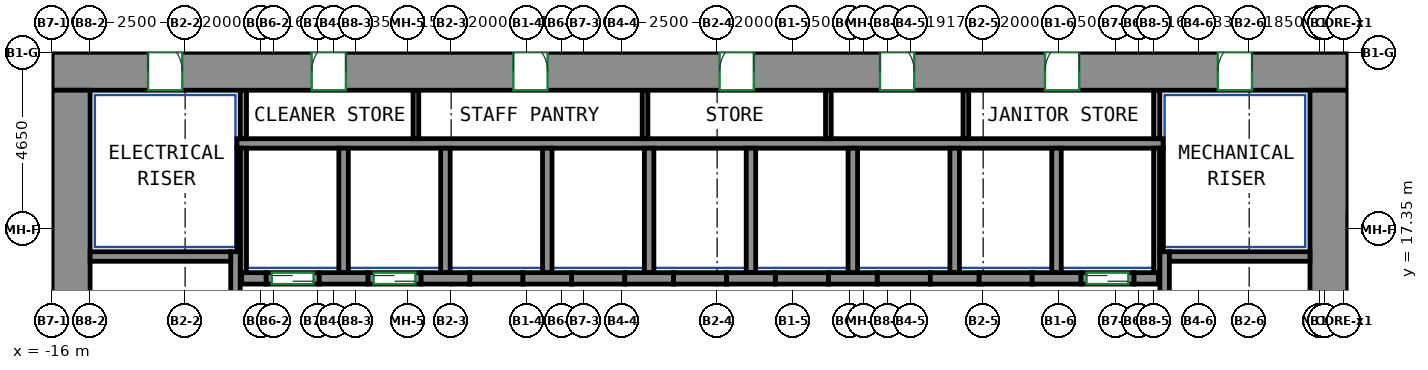
"""IFC4 building model, lengths in metres.
Left out: names, types, materials, properties, quantities, classifications, styles, units other than length and angle.
Written with IfcOpenShell. Run it as: python <this file> out.ifc"""

import sys

from ifc_helpers import new_model, si_unit, direction, frame, frame_2d, origin, place, context, subcontext, project, spatial, rectangle, extrude, source, transform, mapped, element, fill, save


model = new_model("IFC4")
c1 = context("Model", 3, precision=1e-05, world=origin(), true_north=direction((0.0, 1.0)))
c2 = subcontext(c1, "Body", "Model", "MODEL_VIEW")
j1 = project(units=[si_unit("LENGTHUNIT", "METRE"), si_unit("PLANEANGLEUNIT", "RADIAN")], contexts=[c1])
p1 = place(None, origin())
s1 = spatial("IfcSite", under=j1, at=p1, CompositionType="ELEMENT")
p2 = place(p1, origin())
s2 = spatial("IfcBuilding", under=s1, at=p2, CompositionType="ELEMENT")
p3 = place(p2, frame((0.0, 0.0, 71.2)))
s3 = spatial("IfcBuildingStorey", under=s2, at=p3, CompositionType="ELEMENT", Elevation=71.2)
m1 = source(origin(), c2, "Body", "SweptSolid", [
    extrude(rectangle(XDim=34.1, YDim=1.0, at=frame_2d((17.05, 0.0))), origin(), (0.0, 0.0, 1.0), 3.72),
])
p4 = place(p3, frame((-16.0, 21.5, 0.0), z_axis=(0.0, 0.0, 1.0), x_axis=(1.0, 0.0, 0.0)))
e1 = element("IfcWall", 1, at=p4, inside=s3, PredefinedType="SHEAR", context=c2, shape_type="MappedRepresentation", body=[
    mapped(m1, transform((0.0, 0.0, 0.0))),
])
p5 = place(p4, frame((6.831, 0.0, 0.0)))
e2 = element("IfcOpeningElement", 2, at=p5, cuts=e1, PredefinedType="OPENING", context=c2, shape_type="SweptSolid", body=[
    extrude(rectangle(XDim=0.9, YDim=2.1, at=frame_2d((0.45, 1.05))), frame((0.0, 0.51, 0.0), z_axis=(0.0, -1.0, 0.0), x_axis=(1.0, 0.0, 0.0)), (0.0, 0.0, 1.0), 1.02),
])
p6 = place(p4, frame((12.138, 0.0, 0.0)))
e3 = element("IfcOpeningElement", 3, at=p6, cuts=e1, PredefinedType="OPENING", context=c2, shape_type="SweptSolid", body=[
    extrude(rectangle(XDim=0.9, YDim=2.1, at=frame_2d((0.45, 1.05))), frame((0.0, 0.51, 0.0), z_axis=(0.0, -1.0, 0.0), x_axis=(1.0, 0.0, 0.0)), (0.0, 0.0, 1.0), 1.02),
])
p7 = place(p4, frame((17.565, 0.0, 0.0)))
e4 = element("IfcOpeningElement", 4, at=p7, cuts=e1, PredefinedType="OPENING", context=c2, shape_type="SweptSolid", body=[
    extrude(rectangle(XDim=0.9, YDim=2.1, at=frame_2d((0.45, 1.05))), frame((0.0, 0.51, 0.0), z_axis=(0.0, -1.0, 0.0), x_axis=(1.0, 0.0, 0.0)), (0.0, 0.0, 1.0), 1.02),
])
p8 = place(p4, frame((21.786, 0.0, 0.0)))
e5 = element("IfcOpeningElement", 5, at=p8, cuts=e1, PredefinedType="OPENING", context=c2, shape_type="SweptSolid", body=[
    extrude(rectangle(XDim=0.9, YDim=2.1, at=frame_2d((0.45, 1.05))), frame((0.0, 0.51, 0.0), z_axis=(0.0, -1.0, 0.0), x_axis=(1.0, 0.0, 0.0)), (0.0, 0.0, 1.0), 1.02),
])
p9 = place(p4, frame((26.127, 0.0, 0.0)))
e6 = element("IfcOpeningElement", 6, at=p9, cuts=e1, PredefinedType="OPENING", context=c2, shape_type="SweptSolid", body=[
    extrude(rectangle(XDim=0.9, YDim=2.1, at=frame_2d((0.45, 1.05))), frame((0.0, 0.51, 0.0), z_axis=(0.0, -1.0, 0.0), x_axis=(1.0, 0.0, 0.0)), (0.0, 0.0, 1.0), 1.02),
])
p10 = place(p4, frame((2.525, 0.0, 0.0)))
e7 = element("IfcOpeningElement", 7, at=p10, cuts=e1, PredefinedType="OPENING", context=c2, shape_type="SweptSolid", body=[
    extrude(rectangle(XDim=0.9, YDim=2.1, at=frame_2d((0.45, 1.05))), frame((0.0, 0.51, 0.0), z_axis=(0.0, -1.0, 0.0), x_axis=(1.0, 0.0, 0.0)), (0.0, 0.0, 1.0), 1.02),
])
p11 = place(p4, frame((30.675, 0.0, 0.0)))
e8 = element("IfcOpeningElement", 8, at=p11, cuts=e1, PredefinedType="OPENING", context=c2, shape_type="SweptSolid", body=[
    extrude(rectangle(XDim=0.9, YDim=2.1, at=frame_2d((0.45, 1.05))), frame((0.0, 0.51, 0.0), z_axis=(0.0, -1.0, 0.0), x_axis=(1.0, 0.0, 0.0)), (0.0, 0.0, 1.0), 1.02),
])
m2 = source(origin(), c2, "Body", "SweptSolid", [
    extrude(rectangle(XDim=12.0, YDim=1.0, at=frame_2d((6.0, 0.0))), origin(), (0.0, 0.0, 1.0), 3.72),
])
for number, where, z_axis, x_axis in (
    (9, (-15.5, 9.0, 0.0), (0.0, 0.0, 1.0), (0.0, 1.0, 0.0)),
    (10, (17.6, 9.0, 0.0), (0.0, 0.0, 1.0), (0.0, 1.0, 0.0)),
):
    element("IfcWall", number, at=place(p3, frame(where, z_axis=z_axis, x_axis=x_axis)), inside=s3, PredefinedType="SHEAR", context=c2, shape_type="MappedRepresentation", body=[
        mapped(m2, transform((0.0, 0.0, 0.0))),
    ])
m3 = source(origin(), c2, "Body", "SweptSolid", [
    extrude(rectangle(XDim=7.75, YDim=0.25, at=frame_2d((3.875, 0.0))), origin(), (0.0, 0.0, 1.0), 3.72),
])
p12 = place(p3, frame((-11.175, 9.0, 0.0), z_axis=(0.0, 0.0, 1.0), x_axis=(0.0, 1.0, 0.0)))
e11 = element("IfcWall", 11, at=p12, inside=s3, PredefinedType="SHEAR", context=c2, shape_type="MappedRepresentation", body=[
    mapped(m3, transform((0.0, 0.0, 0.0))),
])
m4 = source(origin(), c2, "Body", "SweptSolid", [
    extrude(rectangle(XDim=3.7, YDim=0.25, at=frame_2d((1.85, 0.0))), origin(), (0.0, 0.0, 1.0), 3.72),
])
p13 = place(p3, frame((-15.0, 16.625, 0.0), z_axis=(0.0, 0.0, 1.0), x_axis=(1.0, 0.0, 0.0)))
e12 = element("IfcWall", 12, at=p13, inside=s3, PredefinedType="SHEAR", context=c2, shape_type="MappedRepresentation", body=[
    mapped(m4, transform((0.0, 0.0, 0.0))),
])
p14 = place(p3, frame((13.275, 9.0, 0.0), z_axis=(0.0, 0.0, 1.0), x_axis=(0.0, 1.0, 0.0)))
e13 = element("IfcWall", 13, at=p14, inside=s3, PredefinedType="SHEAR", context=c2, shape_type="MappedRepresentation", body=[
    mapped(m3, transform((0.0, 0.0, 0.0))),
])
m5 = source(origin(), c2, "Body", "SweptSolid", [
    extrude(rectangle(XDim=3.7, YDim=0.25, at=frame_2d((1.85, 0.0))), origin(), (0.0, 0.0, 1.0), 3.72),
])
p15 = place(p3, frame((13.4, 16.625, 0.0), z_axis=(0.0, 0.0, 1.0), x_axis=(1.0, 0.0, 0.0)))
e14 = element("IfcWall", 14, at=p15, inside=s3, PredefinedType="SHEAR", context=c2, shape_type="MappedRepresentation", body=[
    mapped(m5, transform((0.0, 0.0, 0.0))),
])
m6 = source(origin(), c2, "Body", "SweptSolid", [
    extrude(rectangle(XDim=0.64, YDim=0.3, at=frame_2d((0.32, 0.0))), origin(), (0.0, 0.0, 1.0), 3.72),
])
p16 = place(p3, frame((-11.01, 16.05, 0.0), z_axis=(0.0, 0.0, 1.0), x_axis=(1.0, 0.0, 0.0)))
e15 = element("IfcWall", 15, at=p16, inside=s3, PredefinedType="SHEAR", context=c2, shape_type="MappedRepresentation", body=[
    mapped(m6, transform((0.0, 0.0, 0.0))),
])
m7 = source(origin(), c2, "Body", "SweptSolid", [
    extrude(rectangle(XDim=1.28, YDim=0.3, at=frame_2d((0.64, 0.0))), origin(), (0.0, 0.0, 1.0), 3.72),
])
for number, where, z_axis, x_axis in (
    (16, (-8.97, 16.05, 0.0), (0.0, 0.0, 1.0), (1.0, 0.0, 0.0)),
    (17, (-6.29, 16.05, 0.0), (0.0, 0.0, 1.0), (1.0, 0.0, 0.0)),
    (18, (-3.61, 16.05, 0.0), (0.0, 0.0, 1.0), (1.0, 0.0, 0.0)),
    (19, (-0.93, 16.05, 0.0), (0.0, 0.0, 1.0), (1.0, 0.0, 0.0)),
    (20, (1.75, 16.05, 0.0), (0.0, 0.0, 1.0), (1.0, 0.0, 0.0)),
    (21, (4.43, 16.05, 0.0), (0.0, 0.0, 1.0), (1.0, 0.0, 0.0)),
):
    element("IfcWall", number, at=place(p3, frame(where, z_axis=z_axis, x_axis=x_axis)), inside=s3, PredefinedType="SHEAR", context=c2, shape_type="MappedRepresentation", body=[
        mapped(m7, transform((0.0, 0.0, 0.0))),
    ])
m8 = source(origin(), c2, "Body", "SweptSolid", [
    extrude(rectangle(XDim=1.28, YDim=0.3, at=frame_2d((0.64, 0.0))), origin(), (0.0, 0.0, 1.0), 3.72),
])
p17 = place(p3, frame((7.11, 16.05, 0.0), z_axis=(0.0, 0.0, 1.0), x_axis=(1.0, 0.0, 0.0)))
e22 = element("IfcWall", 22, at=p17, inside=s3, PredefinedType="SHEAR", context=c2, shape_type="MappedRepresentation", body=[
    mapped(m8, transform((0.0, 0.0, 0.0))),
])
p18 = place(p3, frame((9.79, 16.05, 0.0), z_axis=(0.0, 0.0, 1.0), x_axis=(1.0, 0.0, 0.0)))
e23 = element("IfcWall", 23, at=p18, inside=s3, PredefinedType="SHEAR", context=c2, shape_type="MappedRepresentation", body=[
    mapped(m7, transform((0.0, 0.0, 0.0))),
])
m9 = source(origin(), c2, "Body", "SweptSolid", [
    extrude(rectangle(XDim=0.64, YDim=0.3, at=frame_2d((0.32, 0.0))), origin(), (0.0, 0.0, 1.0), 3.72),
])
p19 = place(p3, frame((12.47, 16.05, 0.0), z_axis=(0.0, 0.0, 1.0), x_axis=(1.0, 0.0, 0.0)))
e24 = element("IfcWall", 24, at=p19, inside=s3, PredefinedType="SHEAR", context=c2, shape_type="MappedRepresentation", body=[
    mapped(m9, transform((0.0, 0.0, 0.0))),
])
m10 = source(origin(), c2, "Body", "SweptSolid", [
    extrude(rectangle(XDim=1.4, YDim=0.3, at=frame_2d((0.7, 0.0))), origin(), (0.0, 0.0, 1.0), 3.72),
])
p20 = place(p3, frame((11.07, 16.05, 0.0), z_axis=(0.0, 0.0, 1.0), x_axis=(1.0, 0.0, 0.0)))
e25 = element("IfcWall", 25, at=p20, inside=s3, PredefinedType="PARTITIONING", context=c2, shape_type="MappedRepresentation", body=[
    mapped(m10, transform((0.0, 0.0, 0.0))),
])
p21 = place(p20, frame((0.15, 0.0, 0.0)))
e26 = element("IfcOpeningElement", 26, at=p21, cuts=e25, PredefinedType="OPENING", context=c2, shape_type="SweptSolid", body=[
    extrude(rectangle(XDim=1.1, YDim=2.1, at=frame_2d((0.55, 1.05))), frame((0.0, 0.16, 0.0), z_axis=(0.0, -1.0, 0.0), x_axis=(1.0, 0.0, 0.0)), (0.0, 0.0, 1.0), 0.32),
])
m11 = source(origin(), c2, "Body", "SweptSolid", [
    extrude(rectangle(XDim=1.4, YDim=0.3, at=frame_2d((0.7, 0.0))), origin(), (0.0, 0.0, 1.0), 3.72),
])
p22 = place(p3, frame((-10.37, 16.05, 0.0), z_axis=(0.0, 0.0, 1.0), x_axis=(1.0, 0.0, 0.0)))
e27 = element("IfcWall", 27, at=p22, inside=s3, PredefinedType="PARTITIONING", context=c2, shape_type="MappedRepresentation", body=[
    mapped(m11, transform((0.0, 0.0, 0.0))),
])
p23 = place(p22, frame((0.15, 0.0, 0.0)))
e28 = element("IfcOpeningElement", 28, at=p23, cuts=e27, PredefinedType="OPENING", context=c2, shape_type="SweptSolid", body=[
    extrude(rectangle(XDim=1.1, YDim=2.1, at=frame_2d((0.55, 1.05))), frame((0.0, 0.16, 0.0), z_axis=(0.0, -1.0, 0.0), x_axis=(1.0, 0.0, 0.0)), (0.0, 0.0, 1.0), 0.32),
])
p24 = place(p3, frame((-7.69, 16.05, 0.0), z_axis=(0.0, 0.0, 1.0), x_axis=(1.0, 0.0, 0.0)))
e29 = element("IfcWall", 29, at=p24, inside=s3, PredefinedType="PARTITIONING", context=c2, shape_type="MappedRepresentation", body=[
    mapped(m10, transform((0.0, 0.0, 0.0))),
])
p25 = place(p24, frame((0.15, 0.0, 0.0)))
e30 = element("IfcOpeningElement", 30, at=p25, cuts=e29, PredefinedType="OPENING", context=c2, shape_type="SweptSolid", body=[
    extrude(rectangle(XDim=1.1, YDim=2.1, at=frame_2d((0.55, 1.05))), frame((0.0, 0.16, 0.0), z_axis=(0.0, -1.0, 0.0), x_axis=(1.0, 0.0, 0.0)), (0.0, 0.0, 1.0), 0.32),
])
p26 = place(p3, frame((-5.01, 16.05, 0.0), z_axis=(0.0, 0.0, 1.0), x_axis=(1.0, 0.0, 0.0)))
e31 = element("IfcWall", 31, at=p26, inside=s3, PredefinedType="PARTITIONING", context=c2, shape_type="MappedRepresentation", body=[
    mapped(m10, transform((0.0, 0.0, 0.0))),
])
p27 = place(p3, frame((-2.33, 16.05, 0.0), z_axis=(0.0, 0.0, 1.0), x_axis=(1.0, 0.0, 0.0)))
e32 = element("IfcWall", 32, at=p27, inside=s3, PredefinedType="PARTITIONING", context=c2, shape_type="MappedRepresentation", body=[
    mapped(m11, transform((0.0, 0.0, 0.0))),
])
for number, where, z_axis, x_axis in (
    (33, (0.35, 16.05, 0.0), (0.0, 0.0, 1.0), (1.0, 0.0, 0.0)),
    (34, (3.03, 16.05, 0.0), (0.0, 0.0, 1.0), (1.0, 0.0, 0.0)),
):
    element("IfcWall", number, at=place(p3, frame(where, z_axis=z_axis, x_axis=x_axis)), inside=s3, PredefinedType="PARTITIONING", context=c2, shape_type="MappedRepresentation", body=[
        mapped(m10, transform((0.0, 0.0, 0.0))),
    ])
for number, where, z_axis, x_axis in (
    (35, (5.71, 16.05, 0.0), (0.0, 0.0, 1.0), (1.0, 0.0, 0.0)),
    (36, (8.39, 16.05, 0.0), (0.0, 0.0, 1.0), (1.0, 0.0, 0.0)),
):
    element("IfcWall", number, at=place(p3, frame(where, z_axis=z_axis, x_axis=x_axis)), inside=s3, PredefinedType="PARTITIONING", context=c2, shape_type="MappedRepresentation", body=[
        mapped(m11, transform((0.0, 0.0, 0.0))),
    ])
m12 = source(origin(), c2, "Body", "SweptSolid", [
    extrude(rectangle(XDim=24.37, YDim=0.25, at=frame_2d((12.185, 0.0))), origin(), (0.0, 0.0, 1.0), 3.72),
])
p28 = place(p3, frame((-11.135, 19.6, 0.0), z_axis=(0.0, 0.0, 1.0), x_axis=(1.0, 0.0, 0.0)))
e37 = element("IfcWall", 37, at=p28, inside=s3, PredefinedType="PARTITIONING", context=c2, shape_type="MappedRepresentation", body=[
    mapped(m12, transform((0.0, 0.0, 0.0))),
])
m13 = source(origin(), c2, "Body", "SweptSolid", [
    extrude(rectangle(XDim=3.275, YDim=0.165, at=frame_2d((1.638, 0.0))), origin(), (0.0, 0.0, 1.0), 3.72),
])
p29 = place(p3, frame((13.067, 16.2, 0.0), z_axis=(0.0, 0.0, 1.0), x_axis=(0.0, 1.0, 0.0)))
e38 = element("IfcWall", 38, at=p29, inside=s3, PredefinedType="PARTITIONING", context=c2, shape_type="MappedRepresentation", body=[
    mapped(m13, transform((0.0, 0.0, 0.0))),
])
m14 = source(origin(), c2, "Body", "SweptSolid", [
    extrude(rectangle(XDim=1.275, YDim=0.165, at=frame_2d((0.637, 0.0))), origin(), (0.0, 0.0, 1.0), 3.72),
])
p30 = place(p3, frame((13.067, 19.725, 0.0), z_axis=(0.0, 0.0, 1.0), x_axis=(0.0, 1.0, 0.0)))
e39 = element("IfcWall", 39, at=p30, inside=s3, PredefinedType="PARTITIONING", context=c2, shape_type="MappedRepresentation", body=[
    mapped(m14, transform((0.0, 0.0, 0.0))),
])
p31 = place(p3, frame((-10.968, 16.2, 0.0), z_axis=(0.0, 0.0, 1.0), x_axis=(0.0, 1.0, 0.0)))
e40 = element("IfcWall", 40, at=p31, inside=s3, PredefinedType="PARTITIONING", context=c2, shape_type="MappedRepresentation", body=[
    mapped(m13, transform((0.0, 0.0, 0.0))),
])
p32 = place(p3, frame((-10.968, 19.725, 0.0), z_axis=(0.0, 0.0, 1.0), x_axis=(0.0, 1.0, 0.0)))
e41 = element("IfcWall", 41, at=p32, inside=s3, PredefinedType="PARTITIONING", context=c2, shape_type="MappedRepresentation", body=[
    mapped(m14, transform((0.0, 0.0, 0.0))),
])
m15 = source(origin(), c2, "Body", "SweptSolid", [
    extrude(rectangle(XDim=3.275, YDim=0.25, at=frame_2d((1.638, 0.0))), origin(), (0.0, 0.0, 1.0), 3.72),
])
p33 = place(p3, frame((10.43, 16.2, 0.0), z_axis=(0.0, 0.0, 1.0), x_axis=(0.0, 1.0, 0.0)))
e42 = element("IfcWall", 42, at=p33, inside=s3, PredefinedType="PARTITIONING", context=c2, shape_type="MappedRepresentation", body=[
    mapped(m15, transform((0.0, 0.0, 0.0))),
])
m16 = source(origin(), c2, "Body", "SweptSolid", [
    extrude(rectangle(XDim=2.725, YDim=0.085, at=frame_2d((1.363, 0.0))), origin(), (0.0, 0.0, 1.0), 3.72),
])
p34 = place(p3, frame((13.192, 16.75, 0.0), z_axis=(0.0, 0.0, 1.0), x_axis=(0.0, 1.0, 0.0)))
e43 = element("IfcWall", 43, at=p34, inside=s3, PredefinedType="PARTITIONING", context=c2, shape_type="MappedRepresentation", body=[
    mapped(m16, transform((0.0, 0.0, 0.0))),
])
for number, where, z_axis, x_axis in (
    (44, (2.39, 16.2, 0.0), (0.0, 0.0, 1.0), (0.0, 1.0, 0.0)),
    (45, (5.07, 16.2, 0.0), (0.0, 0.0, 1.0), (0.0, 1.0, 0.0)),
    (46, (7.75, 16.2, 0.0), (0.0, 0.0, 1.0), (0.0, 1.0, 0.0)),
    (47, (-0.29, 16.2, 0.0), (0.0, 0.0, 1.0), (0.0, 1.0, 0.0)),
):
    element("IfcWall", number, at=place(p3, frame(where, z_axis=z_axis, x_axis=x_axis)), inside=s3, PredefinedType="PARTITIONING", context=c2, shape_type="MappedRepresentation", body=[
        mapped(m15, transform((0.0, 0.0, 0.0))),
    ])
p35 = place(p3, frame((-11.093, 16.75, 0.0), z_axis=(0.0, 0.0, 1.0), x_axis=(0.0, 1.0, 0.0)))
e48 = element("IfcWall", 48, at=p35, inside=s3, PredefinedType="PARTITIONING", context=c2, shape_type="MappedRepresentation", body=[
    mapped(m16, transform((0.0, 0.0, 0.0))),
])
for number, where, z_axis, x_axis in (
    (49, (-2.97, 16.2, 0.0), (0.0, 0.0, 1.0), (0.0, 1.0, 0.0)),
    (50, (-5.65, 16.2, 0.0), (0.0, 0.0, 1.0), (0.0, 1.0, 0.0)),
    (51, (-8.33, 16.2, 0.0), (0.0, 0.0, 1.0), (0.0, 1.0, 0.0)),
):
    element("IfcWall", number, at=place(p3, frame(where, z_axis=z_axis, x_axis=x_axis)), inside=s3, PredefinedType="PARTITIONING", context=c2, shape_type="MappedRepresentation", body=[
        mapped(m15, transform((0.0, 0.0, 0.0))),
    ])
m17 = source(origin(), c2, "Body", "SweptSolid", [
    extrude(rectangle(XDim=1.275, YDim=0.15, at=frame_2d((0.637, 0.0))), origin(), (0.0, 0.0, 1.0), 3.72),
])
for number, where, z_axis, x_axis in (
    (52, (-6.427, 19.725, 0.0), (0.0, 0.0, 1.0), (0.0, 1.0, 0.0)),
    (53, (-0.397, 19.725, 0.0), (0.0, 0.0, 1.0), (0.0, 1.0, 0.0)),
    (54, (4.427, 19.725, 0.0), (0.0, 0.0, 1.0), (0.0, 1.0, 0.0)),
    (55, (8.045, 19.725, 0.0), (0.0, 0.0, 1.0), (0.0, 1.0, 0.0)),
):
    element("IfcWall", number, at=place(p3, frame(where, z_axis=z_axis, x_axis=x_axis)), inside=s3, PredefinedType="PARTITIONING", context=c2, shape_type="MappedRepresentation", body=[
        mapped(m17, transform((0.0, 0.0, 0.0))),
    ])
p36 = place(p21, origin())
e56 = element("IfcDoor", 56, at=p36, inside=s3, OperationType="DOUBLE_DOOR_SLIDING", PredefinedType="DOOR", context=c2, shape_type="SweptSolid", body=[
    extrude(rectangle(XDim=1.1, YDim=2.1, at=frame_2d((0.55, 1.05))), frame((0.0, 0.025, 0.0), z_axis=(0.0, -1.0, 0.0), x_axis=(1.0, 0.0, 0.0)), (0.0, 0.0, 1.0), 0.05),
])
fill(e26, e56)
p37 = place(p23, origin())
e57 = element("IfcDoor", 57, at=p37, inside=s3, OperationType="DOUBLE_DOOR_SLIDING", PredefinedType="DOOR", context=c2, shape_type="SweptSolid", body=[
    extrude(rectangle(XDim=1.1, YDim=2.1, at=frame_2d((0.55, 1.05))), frame((0.0, 0.025, 0.0), z_axis=(0.0, -1.0, 0.0), x_axis=(1.0, 0.0, 0.0)), (0.0, 0.0, 1.0), 0.05),
])
fill(e28, e57)
p38 = place(p25, origin())
e58 = element("IfcDoor", 58, at=p38, inside=s3, OperationType="DOUBLE_DOOR_SLIDING", PredefinedType="DOOR", context=c2, shape_type="SweptSolid", body=[
    extrude(rectangle(XDim=1.1, YDim=2.1, at=frame_2d((0.55, 1.05))), frame((0.0, 0.025, 0.0), z_axis=(0.0, -1.0, 0.0), x_axis=(1.0, 0.0, 0.0)), (0.0, 0.0, 1.0), 0.05),
])
fill(e30, e58)
p39 = place(p5, origin())
e59 = element("IfcDoor", 59, at=p39, inside=s3, OperationType="SINGLE_SWING_RIGHT", PredefinedType="DOOR", context=c2, shape_type="SweptSolid", body=[
    extrude(rectangle(XDim=0.9, YDim=2.1, at=frame_2d((0.45, 1.05))), frame((0.0, -0.355, 0.0), z_axis=(0.0, -1.0, 0.0), x_axis=(1.0, 0.0, 0.0)), (0.0, 0.0, 1.0), 0.05),
])
fill(e2, e59)
p40 = place(p6, origin())
e60 = element("IfcDoor", 60, at=p40, inside=s3, OperationType="SINGLE_SWING_LEFT", PredefinedType="DOOR", context=c2, shape_type="SweptSolid", body=[
    extrude(rectangle(XDim=0.9, YDim=2.1, at=frame_2d((0.45, 1.05))), frame((0.0, -0.355, 0.0), z_axis=(0.0, -1.0, 0.0), x_axis=(1.0, 0.0, 0.0)), (0.0, 0.0, 1.0), 0.05),
])
fill(e3, e60)
p41 = place(p7, origin())
e61 = element("IfcDoor", 61, at=p41, inside=s3, OperationType="SINGLE_SWING_RIGHT", PredefinedType="DOOR", context=c2, shape_type="SweptSolid", body=[
    extrude(rectangle(XDim=0.9, YDim=2.1, at=frame_2d((0.45, 1.05))), frame((0.0, -0.355, 0.0), z_axis=(0.0, -1.0, 0.0), x_axis=(1.0, 0.0, 0.0)), (0.0, 0.0, 1.0), 0.05),
])
fill(e4, e61)
p42 = place(p8, origin())
e62 = element("IfcDoor", 62, at=p42, inside=s3, OperationType="SINGLE_SWING_LEFT", PredefinedType="DOOR", context=c2, shape_type="SweptSolid", body=[
    extrude(rectangle(XDim=0.9, YDim=2.1, at=frame_2d((0.45, 1.05))), frame((0.0, -0.355, 0.0), z_axis=(0.0, -1.0, 0.0), x_axis=(1.0, 0.0, 0.0)), (0.0, 0.0, 1.0), 0.05),
])
fill(e5, e62)
p43 = place(p9, origin())
e63 = element("IfcDoor", 63, at=p43, inside=s3, OperationType="SINGLE_SWING_RIGHT", PredefinedType="DOOR", context=c2, shape_type="SweptSolid", body=[
    extrude(rectangle(XDim=0.9, YDim=2.1, at=frame_2d((0.45, 1.05))), frame((0.0, -0.355, 0.0), z_axis=(0.0, -1.0, 0.0), x_axis=(1.0, 0.0, 0.0)), (0.0, 0.0, 1.0), 0.05),
])
fill(e6, e63)
p44 = place(p10, origin())
e64 = element("IfcDoor", 64, at=p44, inside=s3, OperationType="SINGLE_SWING_LEFT", PredefinedType="DOOR", context=c2, shape_type="SweptSolid", body=[
    extrude(rectangle(XDim=0.9, YDim=2.1, at=frame_2d((0.45, 1.05))), frame((0.0, -0.355, 0.0), z_axis=(0.0, -1.0, 0.0), x_axis=(1.0, 0.0, 0.0)), (0.0, 0.0, 1.0), 0.05),
])
fill(e7, e64)
p45 = place(p11, origin())
e65 = element("IfcDoor", 65, at=p45, inside=s3, OperationType="SINGLE_SWING_RIGHT", PredefinedType="DOOR", context=c2, shape_type="SweptSolid", body=[
    extrude(rectangle(XDim=0.9, YDim=2.1, at=frame_2d((0.45, 1.05))), frame((0.0, -0.355, 0.0), z_axis=(0.0, -1.0, 0.0), x_axis=(1.0, 0.0, 0.0)), (0.0, 0.0, 1.0), 0.05),
])
fill(e8, e65)
save(model, sys.argv[1])
